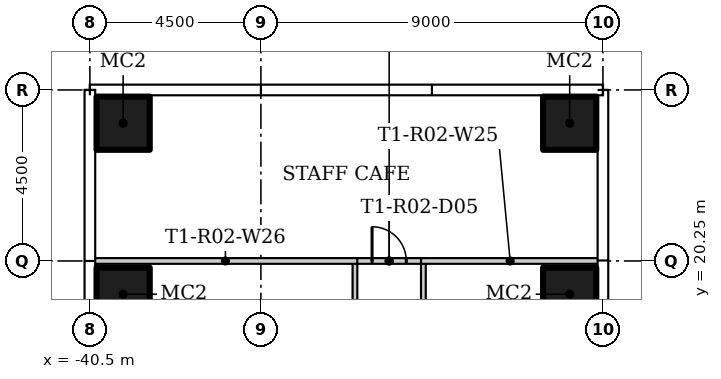
"""IFC4 building model, lengths in metres.
Left out: names, types, materials, properties, quantities, classifications, styles, units other than length and angle.
Written with IfcOpenShell. Run it as: python <this file> out.ifc"""

import sys

from ifc_helpers import new_model, si_unit, direction, frame, frame_2d, origin, origin_2d, place, context, subcontext, project, spatial, rectangle, hollow_rectangle, extrude, element, fill, save


model = new_model("IFC4")
c1 = context("Model", 3, precision=1e-05, world=origin(), true_north=direction((0.0, 1.0)))
c2 = subcontext(c1, "Body", "Model", "MODEL_VIEW")
j1 = project(units=[si_unit("LENGTHUNIT", "METRE"), si_unit("PLANEANGLEUNIT", "RADIAN")], contexts=[c1])
p1 = place(None, origin())
s1 = spatial("IfcSite", under=j1, at=p1, CompositionType="ELEMENT")
p2 = place(p1, origin())
s2 = spatial("IfcBuilding", under=s1, at=p2, CompositionType="ELEMENT")
p3 = place(p2, frame((0.0, 0.0, 33.0)))
s3 = spatial("IfcBuildingStorey", under=s2, at=p3, CompositionType="ELEMENT", Elevation=33.0)
for number, where in (
    (1, (-39.625, 19.375, 0.0)),
    (2, (-39.625, 23.875, 0.0)),
    (3, (-27.875, 19.375, 0.0)),
    (4, (-27.875, 23.875, 0.0)),
):
    element("IfcColumn", number, at=place(p3, frame(where)), inside=s3, PredefinedType="COLUMN", context=c2, shape_type="SweptSolid", body=[
        extrude(hollow_rectangle(XDim=1.4, YDim=1.4, WallThickness=0.05, at=origin_2d()), origin(), (0.0, 0.0, 1.0), 4.15),
    ])
p4 = place(p3, frame((-31.725, 20.175, 0.0), z_axis=(0.0, 0.0, 1.0), x_axis=(0.0, -1.0, 0.0)))
e5 = element("IfcWall", 5, at=p4, inside=s3, PredefinedType="PARTITIONING", context=c2, shape_type="SweptSolid", body=[
    extrude(rectangle(XDim=8.863, YDim=0.125, at=frame_2d((4.431, 0.0))), origin(), (0.0, 0.0, 1.0), 4.15),
])
p5 = place(p4, frame((3.675, 0.0, 0.0)))
e6 = element("IfcOpeningElement", 6, at=p5, cuts=e5, PredefinedType="OPENING", context=c2, shape_type="SweptSolid", body=[
    extrude(rectangle(XDim=1.5, YDim=2.1, at=frame_2d((0.75, 1.05))), frame((0.0, 0.073, 0.0), z_axis=(0.0, -1.0, 0.0), x_axis=(1.0, 0.0, 0.0)), (0.0, 0.0, 1.0), 0.145),
])
p6 = place(p3, frame((-33.525, 6.85, 0.0), z_axis=(0.0, 0.0, 1.0), x_axis=(0.0, 1.0, 0.0)))
e7 = element("IfcWall", 7, at=p6, inside=s3, PredefinedType="PARTITIONING", context=c2, shape_type="SweptSolid", body=[
    extrude(rectangle(XDim=13.325, YDim=0.125, at=frame_2d((6.663, 0.0))), origin(), (0.0, 0.0, 1.0), 4.15),
])
p7 = place(p6, frame((5.9, 0.0, 0.0)))
e8 = element("IfcOpeningElement", 8, at=p7, cuts=e7, PredefinedType="OPENING", context=c2, shape_type="SweptSolid", body=[
    extrude(rectangle(XDim=1.5, YDim=2.1, at=frame_2d((0.75, 1.05))), frame((0.0, 0.073, 0.0), z_axis=(0.0, -1.0, 0.0), x_axis=(1.0, 0.0, 0.0)), (0.0, 0.0, 1.0), 0.145),
])
p8 = place(p3, frame((-33.588, 20.25, 0.0)))
e9 = element("IfcWall", 9, at=p8, inside=s3, PredefinedType="PARTITIONING", context=c2, shape_type="SweptSolid", body=[
    extrude(rectangle(XDim=1.926, YDim=0.15, at=frame_2d((0.963, 0.0))), origin(), (0.0, 0.0, 1.0), 4.15),
])
p9 = place(p8, frame((0.513, 0.0, 0.0)))
e10 = element("IfcOpeningElement", 10, at=p9, cuts=e9, PredefinedType="OPENING", context=c2, shape_type="SweptSolid", body=[
    extrude(rectangle(XDim=0.9, YDim=2.1, at=frame_2d((0.45, 1.05))), frame((0.0, 0.085, 0.0), z_axis=(0.0, -1.0, 0.0), x_axis=(1.0, 0.0, 0.0)), (0.0, 0.0, 1.0), 0.17),
])
p10 = place(p3, frame((-27.095, 20.25, 0.0), z_axis=(0.0, 0.0, 1.0), x_axis=(-1.0, 0.0, 0.0)))
e11 = element("IfcWall", 11, at=p10, inside=s3, PredefinedType="PARTITIONING", context=c2, shape_type="SweptSolid", body=[
    extrude(rectangle(XDim=4.692, YDim=0.15, at=frame_2d((2.346, 0.0))), origin(), (0.0, 0.0, 1.0), 4.15),
])
p11 = place(p3, frame((-33.463, 20.25, 0.0), z_axis=(0.0, 0.0, 1.0), x_axis=(-1.0, 0.0, 0.0)))
e12 = element("IfcWall", 12, at=p11, inside=s3, PredefinedType="PARTITIONING", context=c2, shape_type="SweptSolid", body=[
    extrude(rectangle(XDim=6.942, YDim=0.15, at=frame_2d((3.471, 0.0))), origin(), (0.0, 0.0, 1.0), 4.15),
])
p12 = place(p9, origin())
e13 = element("IfcDoor", 13, at=p12, inside=s3, OperationType="SINGLE_SWING_LEFT", PredefinedType="DOOR", context=c2, shape_type="SweptSolid", body=[
    extrude(rectangle(XDim=0.9, YDim=2.1, at=frame_2d((0.45, 1.05))), frame((0.0, 0.025, 0.0), z_axis=(0.0, -1.0, 0.0), x_axis=(1.0, 0.0, 0.0)), (0.0, 0.0, 1.0), 0.05),
])
fill(e10, e13)
save(model, sys.argv[1])
